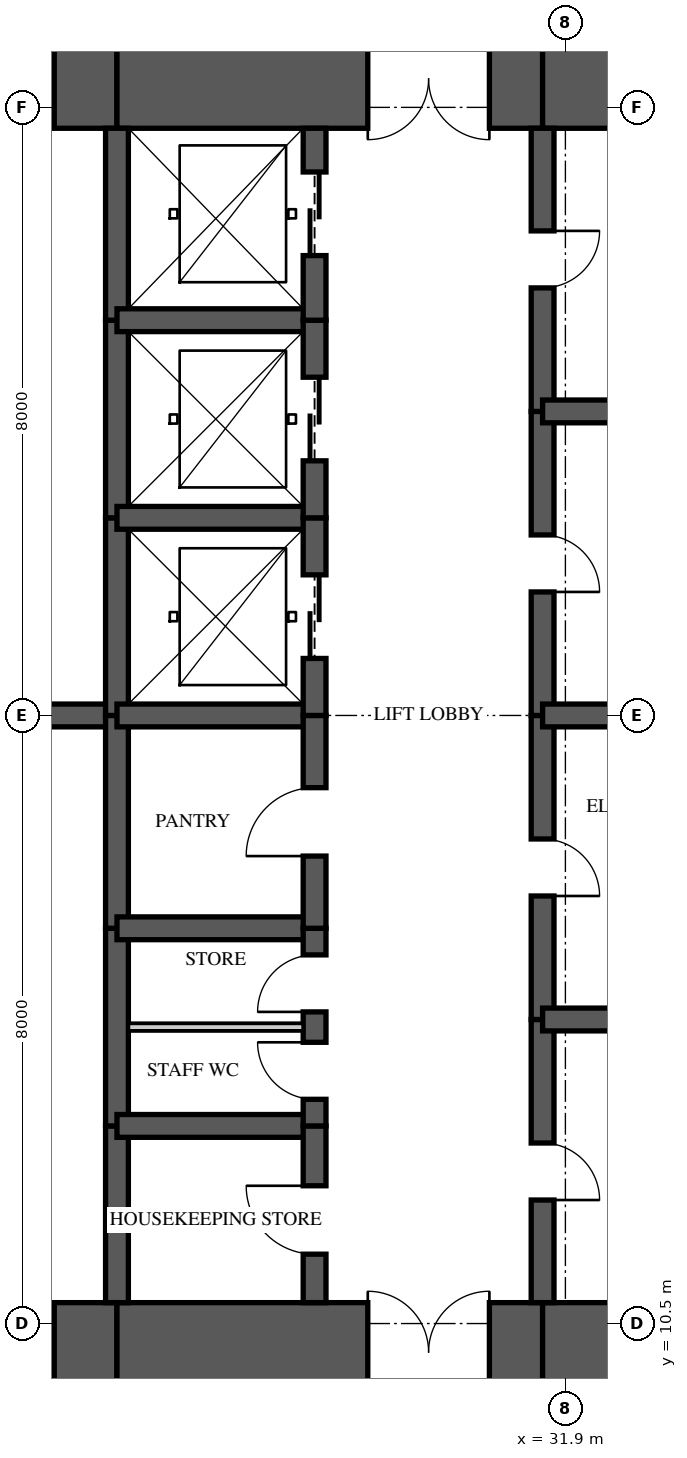
"""IFC4 building model, lengths in metres.
Left out: names, types, materials, properties, quantities, classifications, styles, units other than length and angle.
Written with IfcOpenShell. Run it as: python <this file> out.ifc"""

import sys

from ifc_helpers import new_model, si_unit, direction, frame, frame_2d, origin, place, context, subcontext, project, spatial, rectangle, extrude, element, fill, save


model = new_model("IFC4")
c1 = context("Model", 3, precision=1e-05, world=origin(), true_north=direction((0.0, 1.0)))
c2 = subcontext(c1, "Body", "Model", "MODEL_VIEW")
j1 = project(units=[si_unit("LENGTHUNIT", "METRE"), si_unit("PLANEANGLEUNIT", "RADIAN")], contexts=[c1])
p1 = place(None, origin())
s1 = spatial("IfcSite", under=j1, at=p1, CompositionType="ELEMENT")
p2 = place(p1, origin())
s2 = spatial("IfcBuilding", under=s1, at=p2, CompositionType="ELEMENT")
p3 = place(p2, frame((0.0, 0.0, 177.8)))
s3 = spatial("IfcBuildingStorey", under=s2, at=p3, CompositionType="ELEMENT", Elevation=177.8)
p4 = place(p3, frame((19.65, 10.125, 0.0), z_axis=(0.0, 0.0, 1.0), x_axis=(1.0, 0.0, 0.0)))
e1 = element("IfcWall", 1, at=p4, inside=s3, PredefinedType="SHEAR", context=c2, shape_type="SweptSolid", body=[
    extrude(rectangle(XDim=6.35, YDim=1.3, at=frame_2d((3.175, 0.0))), origin(), (0.0, 0.0, 1.0), 3.35),
])
p5 = place(p4, frame((4.775, 0.0, 0.0)))
e2 = element("IfcOpeningElement", 2, at=p5, cuts=e1, PredefinedType="OPENING", context=c2, shape_type="SweptSolid", body=[
    extrude(rectangle(XDim=0.75, YDim=2.1, at=frame_2d((0.375, 1.05))), frame((0.0, 0.66, 0.0), z_axis=(0.0, -1.0, 0.0), x_axis=(1.0, 0.0, 0.0)), (0.0, 0.0, 1.0), 1.32),
])
p6 = place(p3, frame((26.0, 10.125, 0.0), z_axis=(0.0, 0.0, 1.0), x_axis=(1.0, 0.0, 0.0)))
e3 = element("IfcWall", 3, at=p6, inside=s3, PredefinedType="SHEAR", context=c2, shape_type="SweptSolid", body=[
    extrude(rectangle(XDim=5.6, YDim=1.3, at=frame_2d((2.8, 0.0))), origin(), (0.0, 0.0, 1.0), 3.35),
])
p7 = place(p6, frame((3.3, 0.0, 0.0)))
e4 = element("IfcOpeningElement", 4, at=p7, cuts=e3, PredefinedType="OPENING", context=c2, shape_type="SweptSolid", body=[
    extrude(rectangle(XDim=1.6, YDim=2.1, at=frame_2d((0.8, 1.05))), frame((0.0, 0.66, 0.0), z_axis=(0.0, -1.0, 0.0), x_axis=(1.0, 0.0, 0.0)), (0.0, 0.0, 1.0), 1.32),
])
for number, where, z_axis, x_axis in (
    (5, (31.6, 10.125, 0.0), (0.0, 0.0, 1.0), (1.0, 0.0, 0.0)),
    (6, (35.9, 26.875, 0.0), (0.0, 0.0, 1.0), (-1.0, 0.0, 0.0)),
):
    element("IfcWall", number, at=place(p3, frame(where, z_axis=z_axis, x_axis=x_axis)), inside=s3, PredefinedType="SHEAR", context=c2, shape_type="SweptSolid", body=[
        extrude(rectangle(XDim=4.3, YDim=1.3, at=frame_2d((2.15, 0.0))), origin(), (0.0, 0.0, 1.0), 3.35),
    ])
p8 = place(p3, frame((31.6, 26.875, 0.0), z_axis=(0.0, 0.0, 1.0), x_axis=(-1.0, 0.0, 0.0)))
e7 = element("IfcWall", 7, at=p8, inside=s3, PredefinedType="SHEAR", context=c2, shape_type="SweptSolid", body=[
    extrude(rectangle(XDim=5.6, YDim=1.3, at=frame_2d((2.8, 0.0))), origin(), (0.0, 0.0, 1.0), 3.35),
])
p9 = place(p8, frame((0.7, 0.0, 0.0)))
e8 = element("IfcOpeningElement", 8, at=p9, cuts=e7, PredefinedType="OPENING", context=c2, shape_type="SweptSolid", body=[
    extrude(rectangle(XDim=1.6, YDim=2.1, at=frame_2d((0.8, 1.05))), frame((0.0, 0.66, 0.0), z_axis=(0.0, -1.0, 0.0), x_axis=(1.0, 0.0, 0.0)), (0.0, 0.0, 1.0), 1.32),
])
p10 = place(p3, frame((26.0, 26.875, 0.0), z_axis=(0.0, 0.0, 1.0), x_axis=(-1.0, 0.0, 0.0)))
e9 = element("IfcWall", 9, at=p10, inside=s3, PredefinedType="SHEAR", context=c2, shape_type="SweptSolid", body=[
    extrude(rectangle(XDim=6.35, YDim=1.3, at=frame_2d((3.175, 0.0))), origin(), (0.0, 0.0, 1.0), 3.35),
])
p11 = place(p10, frame((0.825, 0.0, 0.0)))
e10 = element("IfcOpeningElement", 10, at=p11, cuts=e9, PredefinedType="OPENING", context=c2, shape_type="SweptSolid", body=[
    extrude(rectangle(XDim=0.75, YDim=2.1, at=frame_2d((0.375, 1.05))), frame((0.0, 0.66, 0.0), z_axis=(0.0, -1.0, 0.0), x_axis=(1.0, 0.0, 0.0)), (0.0, 0.0, 1.0), 1.32),
])
p12 = place(p3, frame((26.0, 10.775, 0.0), z_axis=(0.0, 0.0, 1.0), x_axis=(0.0, 1.0, 0.0)))
e11 = element("IfcWall", 11, at=p12, inside=s3, PredefinedType="SHEAR", context=c2, shape_type="SweptSolid", body=[
    extrude(rectangle(XDim=2.325, YDim=0.3, at=frame_2d((1.163, 0.0))), origin(), (0.0, 0.0, 1.0), 3.35),
])
p13 = place(p3, frame((26.0, 13.1, 0.0), z_axis=(0.0, 0.0, 1.0), x_axis=(0.0, 1.0, 0.0)))
e12 = element("IfcWall", 12, at=p13, inside=s3, PredefinedType="SHEAR", context=c2, shape_type="SweptSolid", body=[
    extrude(rectangle(XDim=2.6, YDim=0.3, at=frame_2d((1.3, 0.0))), origin(), (0.0, 0.0, 1.0), 3.35),
])
p14 = place(p3, frame((26.0, 15.7, 0.0), z_axis=(0.0, 0.0, 1.0), x_axis=(0.0, 1.0, 0.0)))
e13 = element("IfcWall", 13, at=p14, inside=s3, PredefinedType="SHEAR", context=c2, shape_type="SweptSolid", body=[
    extrude(rectangle(XDim=2.8, YDim=0.3, at=frame_2d((1.4, 0.0))), origin(), (0.0, 0.0, 1.0), 3.35),
])
p15 = place(p3, frame((26.0, 18.5, 0.0), z_axis=(0.0, 0.0, 1.0), x_axis=(0.0, 1.0, 0.0)))
e14 = element("IfcWall", 14, at=p15, inside=s3, PredefinedType="SHEAR", context=c2, shape_type="SweptSolid", body=[
    extrude(rectangle(XDim=2.6, YDim=0.3, at=frame_2d((1.3, 0.0))), origin(), (0.0, 0.0, 1.0), 3.35),
])
p16 = place(p3, frame((26.0, 21.1, 0.0), z_axis=(0.0, 0.0, 1.0), x_axis=(0.0, 1.0, 0.0)))
e15 = element("IfcWall", 15, at=p16, inside=s3, PredefinedType="SHEAR", context=c2, shape_type="SweptSolid", body=[
    extrude(rectangle(XDim=2.6, YDim=0.3, at=frame_2d((1.3, 0.0))), origin(), (0.0, 0.0, 1.0), 3.35),
])
p17 = place(p3, frame((26.0, 23.7, 0.0), z_axis=(0.0, 0.0, 1.0), x_axis=(0.0, 1.0, 0.0)))
e16 = element("IfcWall", 16, at=p17, inside=s3, PredefinedType="SHEAR", context=c2, shape_type="SweptSolid", body=[
    extrude(rectangle(XDim=2.525, YDim=0.3, at=frame_2d((1.263, 0.0))), origin(), (0.0, 0.0, 1.0), 3.35),
])
p18 = place(p3, frame((28.6, 10.775, 0.0), z_axis=(0.0, 0.0, 1.0), x_axis=(0.0, 1.0, 0.0)))
e17 = element("IfcWall", 17, at=p18, inside=s3, PredefinedType="SHEAR", context=c2, shape_type="SweptSolid", body=[
    extrude(rectangle(XDim=2.325, YDim=0.3, at=frame_2d((1.163, 0.0))), origin(), (0.0, 0.0, 1.0), 3.35),
])
p19 = place(p18, frame((0.637, 0.0, 0.0)))
e18 = element("IfcOpeningElement", 18, at=p19, cuts=e17, PredefinedType="OPENING", context=c2, shape_type="SweptSolid", body=[
    extrude(rectangle(XDim=0.9, YDim=2.1, at=frame_2d((0.45, 1.05))), frame((0.0, 0.16, 0.0), z_axis=(0.0, -1.0, 0.0), x_axis=(1.0, 0.0, 0.0)), (0.0, 0.0, 1.0), 0.32),
])
p20 = place(p3, frame((28.6, 13.1, 0.0), z_axis=(0.0, 0.0, 1.0), x_axis=(0.0, 1.0, 0.0)))
e19 = element("IfcWall", 19, at=p20, inside=s3, PredefinedType="SHEAR", context=c2, shape_type="SweptSolid", body=[
    extrude(rectangle(XDim=2.6, YDim=0.3, at=frame_2d((1.3, 0.0))), origin(), (0.0, 0.0, 1.0), 3.35),
])
p21 = place(p20, frame((0.35, 0.0, 0.0)))
e20 = element("IfcOpeningElement", 20, at=p21, cuts=e19, PredefinedType="OPENING", context=c2, shape_type="SweptSolid", body=[
    extrude(rectangle(XDim=0.75, YDim=2.1, at=frame_2d((0.375, 1.05))), frame((0.0, 0.16, 0.0), z_axis=(0.0, -1.0, 0.0), x_axis=(1.0, 0.0, 0.0)), (0.0, 0.0, 1.0), 0.32),
])
p22 = place(p20, frame((1.5, 0.0, 0.0)))
e21 = element("IfcOpeningElement", 21, at=p22, cuts=e19, PredefinedType="OPENING", context=c2, shape_type="SweptSolid", body=[
    extrude(rectangle(XDim=0.75, YDim=2.1, at=frame_2d((0.375, 1.05))), frame((0.0, 0.16, 0.0), z_axis=(0.0, -1.0, 0.0), x_axis=(1.0, 0.0, 0.0)), (0.0, 0.0, 1.0), 0.32),
])
p23 = place(p3, frame((28.6, 15.7, 0.0), z_axis=(0.0, 0.0, 1.0), x_axis=(0.0, 1.0, 0.0)))
e22 = element("IfcWall", 22, at=p23, inside=s3, PredefinedType="SHEAR", context=c2, shape_type="SweptSolid", body=[
    extrude(rectangle(XDim=2.8, YDim=0.3, at=frame_2d((1.4, 0.0))), origin(), (0.0, 0.0, 1.0), 3.35),
])
p24 = place(p23, frame((0.95, 0.0, 0.0)))
e23 = element("IfcOpeningElement", 23, at=p24, cuts=e22, PredefinedType="OPENING", context=c2, shape_type="SweptSolid", body=[
    extrude(rectangle(XDim=0.9, YDim=2.1, at=frame_2d((0.45, 1.05))), frame((0.0, 0.16, 0.0), z_axis=(0.0, -1.0, 0.0), x_axis=(1.0, 0.0, 0.0)), (0.0, 0.0, 1.0), 0.32),
])
p25 = place(p3, frame((28.6, 18.5, 0.0), z_axis=(0.0, 0.0, 1.0), x_axis=(0.0, 1.0, 0.0)))
e24 = element("IfcWall", 24, at=p25, inside=s3, PredefinedType="SHEAR", context=c2, shape_type="SweptSolid", body=[
    extrude(rectangle(XDim=2.6, YDim=0.3, at=frame_2d((1.3, 0.0))), origin(), (0.0, 0.0, 1.0), 3.35),
])
p26 = place(p25, frame((0.75, 0.0, 0.0)))
e25 = element("IfcOpeningElement", 25, at=p26, cuts=e24, PredefinedType="OPENING", context=c2, shape_type="SweptSolid", body=[
    extrude(rectangle(XDim=1.1, YDim=2.1, at=frame_2d((0.55, 1.05))), frame((0.0, 0.16, 0.0), z_axis=(0.0, -1.0, 0.0), x_axis=(1.0, 0.0, 0.0)), (0.0, 0.0, 1.0), 0.32),
])
p27 = place(p3, frame((28.6, 21.1, 0.0), z_axis=(0.0, 0.0, 1.0), x_axis=(0.0, 1.0, 0.0)))
e26 = element("IfcWall", 26, at=p27, inside=s3, PredefinedType="SHEAR", context=c2, shape_type="SweptSolid", body=[
    extrude(rectangle(XDim=2.6, YDim=0.3, at=frame_2d((1.3, 0.0))), origin(), (0.0, 0.0, 1.0), 3.35),
])
p28 = place(p27, frame((0.75, 0.0, 0.0)))
e27 = element("IfcOpeningElement", 27, at=p28, cuts=e26, PredefinedType="OPENING", context=c2, shape_type="SweptSolid", body=[
    extrude(rectangle(XDim=1.1, YDim=2.1, at=frame_2d((0.55, 1.05))), frame((0.0, 0.16, 0.0), z_axis=(0.0, -1.0, 0.0), x_axis=(1.0, 0.0, 0.0)), (0.0, 0.0, 1.0), 0.32),
])
p29 = place(p3, frame((28.6, 23.7, 0.0), z_axis=(0.0, 0.0, 1.0), x_axis=(0.0, 1.0, 0.0)))
e28 = element("IfcWall", 28, at=p29, inside=s3, PredefinedType="SHEAR", context=c2, shape_type="SweptSolid", body=[
    extrude(rectangle(XDim=2.525, YDim=0.3, at=frame_2d((1.263, 0.0))), origin(), (0.0, 0.0, 1.0), 3.35),
])
p30 = place(p29, frame((0.85, 0.0, 0.0)))
e29 = element("IfcOpeningElement", 29, at=p30, cuts=e28, PredefinedType="OPENING", context=c2, shape_type="SweptSolid", body=[
    extrude(rectangle(XDim=1.1, YDim=2.1, at=frame_2d((0.55, 1.05))), frame((0.0, 0.16, 0.0), z_axis=(0.0, -1.0, 0.0), x_axis=(1.0, 0.0, 0.0)), (0.0, 0.0, 1.0), 0.32),
])
p31 = place(p3, frame((31.6, 10.775, 0.0), z_axis=(0.0, 0.0, 1.0), x_axis=(0.0, 1.0, 0.0)))
e30 = element("IfcWall", 30, at=p31, inside=s3, PredefinedType="SHEAR", context=c2, shape_type="SweptSolid", body=[
    extrude(rectangle(XDim=3.725, YDim=0.3, at=frame_2d((1.863, 0.0))), origin(), (0.0, 0.0, 1.0), 3.35),
])
p32 = place(p31, frame((1.35, 0.0, 0.0)))
e31 = element("IfcOpeningElement", 31, at=p32, cuts=e30, PredefinedType="OPENING", context=c2, shape_type="SweptSolid", body=[
    extrude(rectangle(XDim=0.75, YDim=2.1, at=frame_2d((0.375, 1.05))), frame((0.0, 0.16, 0.0), z_axis=(0.0, -1.0, 0.0), x_axis=(1.0, 0.0, 0.0)), (0.0, 0.0, 1.0), 0.32),
])
p33 = place(p3, frame((31.6, 14.5, 0.0), z_axis=(0.0, 0.0, 1.0), x_axis=(0.0, 1.0, 0.0)))
e32 = element("IfcWall", 32, at=p33, inside=s3, PredefinedType="SHEAR", context=c2, shape_type="SweptSolid", body=[
    extrude(rectangle(XDim=4.0, YDim=0.3, at=frame_2d((2.0, 0.0))), origin(), (0.0, 0.0, 1.0), 3.35),
])
p34 = place(p33, frame((1.625, 0.0, 0.0)))
e33 = element("IfcOpeningElement", 33, at=p34, cuts=e32, PredefinedType="OPENING", context=c2, shape_type="SweptSolid", body=[
    extrude(rectangle(XDim=0.75, YDim=2.1, at=frame_2d((0.375, 1.05))), frame((0.0, 0.16, 0.0), z_axis=(0.0, -1.0, 0.0), x_axis=(1.0, 0.0, 0.0)), (0.0, 0.0, 1.0), 0.32),
])
p35 = place(p3, frame((31.6, 18.5, 0.0), z_axis=(0.0, 0.0, 1.0), x_axis=(0.0, 1.0, 0.0)))
e34 = element("IfcWall", 34, at=p35, inside=s3, PredefinedType="SHEAR", context=c2, shape_type="SweptSolid", body=[
    extrude(rectangle(XDim=4.0, YDim=0.3, at=frame_2d((2.0, 0.0))), origin(), (0.0, 0.0, 1.0), 3.35),
])
p36 = place(p35, frame((1.625, 0.0, 0.0)))
e35 = element("IfcOpeningElement", 35, at=p36, cuts=e34, PredefinedType="OPENING", context=c2, shape_type="SweptSolid", body=[
    extrude(rectangle(XDim=0.75, YDim=2.1, at=frame_2d((0.375, 1.05))), frame((0.0, 0.16, 0.0), z_axis=(0.0, -1.0, 0.0), x_axis=(1.0, 0.0, 0.0)), (0.0, 0.0, 1.0), 0.32),
])
p37 = place(p3, frame((31.6, 22.5, 0.0), z_axis=(0.0, 0.0, 1.0), x_axis=(0.0, 1.0, 0.0)))
e36 = element("IfcWall", 36, at=p37, inside=s3, PredefinedType="SHEAR", context=c2, shape_type="SweptSolid", body=[
    extrude(rectangle(XDim=3.725, YDim=0.3, at=frame_2d((1.863, 0.0))), origin(), (0.0, 0.0, 1.0), 3.35),
])
p38 = place(p37, frame((1.625, 0.0, 0.0)))
e37 = element("IfcOpeningElement", 37, at=p38, cuts=e36, PredefinedType="OPENING", context=c2, shape_type="SweptSolid", body=[
    extrude(rectangle(XDim=0.75, YDim=2.1, at=frame_2d((0.375, 1.05))), frame((0.0, 0.16, 0.0), z_axis=(0.0, -1.0, 0.0), x_axis=(1.0, 0.0, 0.0)), (0.0, 0.0, 1.0), 0.32),
])
p39 = place(p3, frame((23.6, 18.5, 0.0), z_axis=(0.0, 0.0, 1.0), x_axis=(1.0, 0.0, 0.0)))
e38 = element("IfcWall", 38, at=p39, inside=s3, PredefinedType="SHEAR", context=c2, shape_type="SweptSolid", body=[
    extrude(rectangle(XDim=2.4, YDim=0.3, at=frame_2d((1.2, 0.0))), origin(), (0.0, 0.0, 1.0), 3.35),
])
for number, where, z_axis, x_axis in (
    (39, (26.0, 13.1, 0.0), (0.0, 0.0, 1.0), (1.0, 0.0, 0.0)),
    (40, (26.0, 15.7, 0.0), (0.0, 0.0, 1.0), (1.0, 0.0, 0.0)),
    (41, (26.0, 18.5, 0.0), (0.0, 0.0, 1.0), (1.0, 0.0, 0.0)),
    (42, (26.0, 21.1, 0.0), (0.0, 0.0, 1.0), (1.0, 0.0, 0.0)),
    (43, (26.0, 23.7, 0.0), (0.0, 0.0, 1.0), (1.0, 0.0, 0.0)),
):
    element("IfcWall", number, at=place(p3, frame(where, z_axis=z_axis, x_axis=x_axis)), inside=s3, PredefinedType="SHEAR", context=c2, shape_type="SweptSolid", body=[
        extrude(rectangle(XDim=2.6, YDim=0.3, at=frame_2d((1.3, 0.0))), origin(), (0.0, 0.0, 1.0), 3.35),
    ])
for number, where, z_axis, x_axis in (
    (44, (31.6, 14.5, 0.0), (0.0, 0.0, 1.0), (1.0, 0.0, 0.0)),
    (45, (31.6, 18.5, 0.0), (0.0, 0.0, 1.0), (1.0, 0.0, 0.0)),
    (46, (31.6, 22.5, 0.0), (0.0, 0.0, 1.0), (1.0, 0.0, 0.0)),
):
    element("IfcWall", number, at=place(p3, frame(where, z_axis=z_axis, x_axis=x_axis)), inside=s3, PredefinedType="SHEAR", context=c2, shape_type="SweptSolid", body=[
        extrude(rectangle(XDim=4.3, YDim=0.3, at=frame_2d((2.15, 0.0))), origin(), (0.0, 0.0, 1.0), 3.35),
    ])
p40 = place(p3, frame((26.15, 14.4, 0.0), z_axis=(0.0, 0.0, 1.0), x_axis=(1.0, 0.0, 0.0)))
e47 = element("IfcWall", 47, at=p40, inside=s3, PredefinedType="PARTITIONING", context=c2, shape_type="SweptSolid", body=[
    extrude(rectangle(XDim=2.3, YDim=0.1, at=frame_2d((1.15, 0.0))), origin(), (0.0, 0.0, 1.0), 3.11),
])
p41 = place(p26, origin())
e48 = element("IfcDoor", 48, at=p41, inside=s3, OperationType="SLIDING_TO_LEFT", PredefinedType="DOOR", context=c2, shape_type="SweptSolid", body=[
    extrude(rectangle(XDim=1.1, YDim=2.1, at=frame_2d((0.55, 1.05))), frame((0.0, 0.025, 0.0), z_axis=(0.0, -1.0, 0.0), x_axis=(1.0, 0.0, 0.0)), (0.0, 0.0, 1.0), 0.05),
])
fill(e25, e48)
p42 = place(p28, origin())
e49 = element("IfcDoor", 49, at=p42, inside=s3, OperationType="SLIDING_TO_LEFT", PredefinedType="DOOR", context=c2, shape_type="SweptSolid", body=[
    extrude(rectangle(XDim=1.1, YDim=2.1, at=frame_2d((0.55, 1.05))), frame((0.0, 0.025, 0.0), z_axis=(0.0, -1.0, 0.0), x_axis=(1.0, 0.0, 0.0)), (0.0, 0.0, 1.0), 0.05),
])
fill(e27, e49)
p43 = place(p30, origin())
e50 = element("IfcDoor", 50, at=p43, inside=s3, OperationType="SLIDING_TO_LEFT", PredefinedType="DOOR", context=c2, shape_type="SweptSolid", body=[
    extrude(rectangle(XDim=1.1, YDim=2.1, at=frame_2d((0.55, 1.05))), frame((0.0, 0.025, 0.0), z_axis=(0.0, -1.0, 0.0), x_axis=(1.0, 0.0, 0.0)), (0.0, 0.0, 1.0), 0.05),
])
fill(e29, e50)
p44 = place(p19, origin())
e51 = element("IfcDoor", 51, at=p44, inside=s3, OperationType="SINGLE_SWING_RIGHT", PredefinedType="DOOR", context=c2, shape_type="SweptSolid", body=[
    extrude(rectangle(XDim=0.9, YDim=2.1, at=frame_2d((0.45, 1.05))), frame((0.0, 0.025, 0.0), z_axis=(0.0, -1.0, 0.0), x_axis=(1.0, 0.0, 0.0)), (0.0, 0.0, 1.0), 0.05),
])
fill(e18, e51)
p45 = place(p21, origin())
e52 = element("IfcDoor", 52, at=p45, inside=s3, OperationType="SINGLE_SWING_RIGHT", PredefinedType="DOOR", context=c2, shape_type="SweptSolid", body=[
    extrude(rectangle(XDim=0.75, YDim=2.1, at=frame_2d((0.375, 1.05))), frame((0.0, 0.025, 0.0), z_axis=(0.0, -1.0, 0.0), x_axis=(1.0, 0.0, 0.0)), (0.0, 0.0, 1.0), 0.05),
])
fill(e20, e52)
p46 = place(p22, origin())
e53 = element("IfcDoor", 53, at=p46, inside=s3, OperationType="SINGLE_SWING_LEFT", PredefinedType="DOOR", context=c2, shape_type="SweptSolid", body=[
    extrude(rectangle(XDim=0.75, YDim=2.1, at=frame_2d((0.375, 1.05))), frame((0.0, 0.025, 0.0), z_axis=(0.0, -1.0, 0.0), x_axis=(1.0, 0.0, 0.0)), (0.0, 0.0, 1.0), 0.05),
])
fill(e21, e53)
p47 = place(p24, origin())
e54 = element("IfcDoor", 54, at=p47, inside=s3, OperationType="SINGLE_SWING_LEFT", PredefinedType="DOOR", context=c2, shape_type="SweptSolid", body=[
    extrude(rectangle(XDim=0.9, YDim=2.1, at=frame_2d((0.45, 1.05))), frame((0.0, 0.025, 0.0), z_axis=(0.0, -1.0, 0.0), x_axis=(1.0, 0.0, 0.0)), (0.0, 0.0, 1.0), 0.05),
])
fill(e23, e54)
p48 = place(p7, origin())
e55 = element("IfcDoor", 55, at=p48, inside=s3, OperationType="DOUBLE_DOOR_SINGLE_SWING", PredefinedType="DOOR", context=c2, shape_type="SweptSolid", body=[
    extrude(rectangle(XDim=1.6, YDim=2.1, at=frame_2d((0.8, 1.05))), frame((0.0, 0.025, 0.0), z_axis=(0.0, -1.0, 0.0), x_axis=(1.0, 0.0, 0.0)), (0.0, 0.0, 1.0), 0.05),
])
fill(e4, e55)
p49 = place(p9, origin())
e56 = element("IfcDoor", 56, at=p49, inside=s3, OperationType="DOUBLE_DOOR_SINGLE_SWING", PredefinedType="DOOR", context=c2, shape_type="SweptSolid", body=[
    extrude(rectangle(XDim=1.6, YDim=2.1, at=frame_2d((0.8, 1.05))), frame((0.0, 0.025, 0.0), z_axis=(0.0, -1.0, 0.0), x_axis=(1.0, 0.0, 0.0)), (0.0, 0.0, 1.0), 0.05),
])
fill(e8, e56)
p50 = place(p32, frame((0.75, 0.0, 0.0), z_axis=(0.0, 0.0, 1.0), x_axis=(-1.0, 0.0, 0.0)))
e57 = element("IfcDoor", 57, at=p50, inside=s3, OperationType="SINGLE_SWING_RIGHT", PredefinedType="DOOR", context=c2, shape_type="SweptSolid", body=[
    extrude(rectangle(XDim=0.75, YDim=2.1, at=frame_2d((0.375, 1.05))), frame((0.0, 0.025, 0.0), z_axis=(0.0, -1.0, 0.0), x_axis=(1.0, 0.0, 0.0)), (0.0, 0.0, 1.0), 0.05),
])
fill(e31, e57)
p51 = place(p34, frame((0.75, 0.0, 0.0), z_axis=(0.0, 0.0, 1.0), x_axis=(-1.0, 0.0, 0.0)))
e58 = element("IfcDoor", 58, at=p51, inside=s3, OperationType="SINGLE_SWING_RIGHT", PredefinedType="DOOR", context=c2, shape_type="SweptSolid", body=[
    extrude(rectangle(XDim=0.75, YDim=2.1, at=frame_2d((0.375, 1.05))), frame((0.0, 0.025, 0.0), z_axis=(0.0, -1.0, 0.0), x_axis=(1.0, 0.0, 0.0)), (0.0, 0.0, 1.0), 0.05),
])
fill(e33, e58)
p52 = place(p36, frame((0.75, 0.0, 0.0), z_axis=(0.0, 0.0, 1.0), x_axis=(-1.0, 0.0, 0.0)))
e59 = element("IfcDoor", 59, at=p52, inside=s3, OperationType="SINGLE_SWING_RIGHT", PredefinedType="DOOR", context=c2, shape_type="SweptSolid", body=[
    extrude(rectangle(XDim=0.75, YDim=2.1, at=frame_2d((0.375, 1.05))), frame((0.0, 0.025, 0.0), z_axis=(0.0, -1.0, 0.0), x_axis=(1.0, 0.0, 0.0)), (0.0, 0.0, 1.0), 0.05),
])
fill(e35, e59)
p53 = place(p38, frame((0.75, 0.0, 0.0), z_axis=(0.0, 0.0, 1.0), x_axis=(-1.0, 0.0, 0.0)))
e60 = element("IfcDoor", 60, at=p53, inside=s3, OperationType="SINGLE_SWING_LEFT", PredefinedType="DOOR", context=c2, shape_type="SweptSolid", body=[
    extrude(rectangle(XDim=0.75, YDim=2.1, at=frame_2d((0.375, 1.05))), frame((0.0, 0.025, 0.0), z_axis=(0.0, -1.0, 0.0), x_axis=(1.0, 0.0, 0.0)), (0.0, 0.0, 1.0), 0.05),
])
fill(e37, e60)
p54 = place(p5, origin())
e61 = element("IfcDoor", 61, at=p54, inside=s3, OperationType="SINGLE_SWING_LEFT", PredefinedType="DOOR", context=c2, shape_type="SweptSolid", body=[
    extrude(rectangle(XDim=0.75, YDim=2.1, at=frame_2d((0.375, 1.05))), frame((0.0, 0.025, 0.0), z_axis=(0.0, -1.0, 0.0), x_axis=(1.0, 0.0, 0.0)), (0.0, 0.0, 1.0), 0.05),
])
fill(e2, e61)
p55 = place(p11, origin())
e62 = element("IfcDoor", 62, at=p55, inside=s3, OperationType="SINGLE_SWING_RIGHT", PredefinedType="DOOR", context=c2, shape_type="SweptSolid", body=[
    extrude(rectangle(XDim=0.75, YDim=2.1, at=frame_2d((0.375, 1.05))), frame((0.0, 0.025, 0.0), z_axis=(0.0, -1.0, 0.0), x_axis=(1.0, 0.0, 0.0)), (0.0, 0.0, 1.0), 0.05),
])
fill(e10, e62)
save(model, sys.argv[1])
